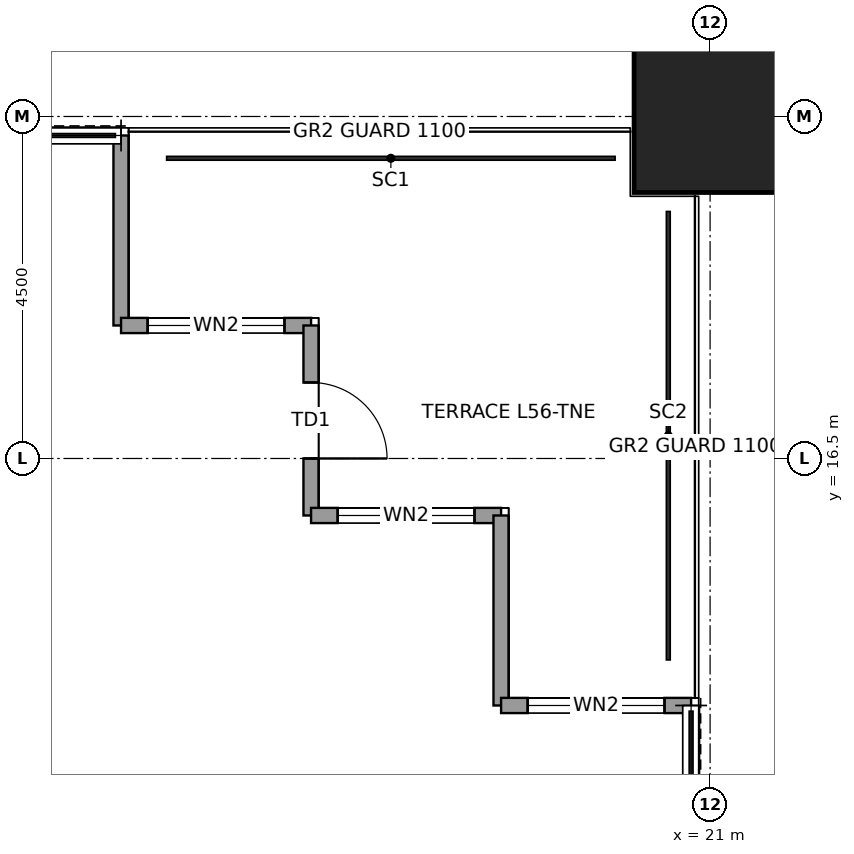
"""IFC4 building model, lengths in metres.
Left out: names, types, materials, properties, quantities, classifications, styles, units other than length and angle.
Written with IfcOpenShell. Run it as: python <this file> out.ifc"""

import sys

from ifc_helpers import new_model, si_unit, direction, frame, frame_2d, origin, origin_2d, place, context, subcontext, project, spatial, rectangle, hollow_rectangle, extrude, element, fill, save


model = new_model("IFC4")
c1 = context("Model", 3, precision=1e-05, world=origin(), true_north=direction((0.0, 1.0)))
c2 = subcontext(c1, "Body", "Model", "MODEL_VIEW")
j1 = project(units=[si_unit("LENGTHUNIT", "METRE"), si_unit("PLANEANGLEUNIT", "RADIAN")], contexts=[c1])
p1 = place(None, origin())
s1 = spatial("IfcSite", under=j1, at=p1, CompositionType="ELEMENT")
p2 = place(p1, origin())
s2 = spatial("IfcBuilding", under=s1, at=p2, CompositionType="ELEMENT")
p3 = place(p2, frame((0.0, 0.0, 259.9)))
s3 = spatial("IfcBuildingStorey", under=s2, at=p3, CompositionType="ELEMENT", Elevation=259.9)
p4 = place(p3, frame((21.0, 21.0, 0.0), z_axis=(0.0, 0.0, 1.0), x_axis=(1.0, 0.0, 0.0)))
e1 = element("IfcColumn", 1, at=p4, inside=s3, PredefinedType="COLUMN", context=c2, shape_type="SweptSolid", body=[
    extrude(hollow_rectangle(XDim=2.0, YDim=2.0, WallThickness=0.095, at=origin_2d()), origin(), (0.0, 0.0, 1.0), 4.0),
])
p5 = place(p3, frame((13.25, 20.75, 0.0), z_axis=(0.0, 0.0, 1.0), x_axis=(0.0, -1.0, 0.0)))
e2 = element("IfcWall", 2, at=p5, inside=s3, PredefinedType="SOLIDWALL", context=c2, shape_type="SweptSolid", body=[
    extrude(rectangle(XDim=2.5, YDim=0.2, at=frame_2d((1.25, 0.0))), origin(), (0.0, 0.0, 1.0), 3.85),
])
p6 = place(p3, frame((13.25, 18.25, 0.0), z_axis=(0.0, 0.0, 1.0), x_axis=(1.0, 0.0, 0.0)))
e3 = element("IfcWall", 3, at=p6, inside=s3, PredefinedType="SOLIDWALL", context=c2, shape_type="SweptSolid", body=[
    extrude(rectangle(XDim=2.5, YDim=0.2, at=frame_2d((1.25, 0.0))), origin(), (0.0, 0.0, 1.0), 3.85),
])
p7 = place(p6, frame((0.35, 0.0, 0.3)))
e4 = element("IfcOpeningElement", 4, at=p7, cuts=e3, PredefinedType="OPENING", context=c2, shape_type="SweptSolid", body=[
    extrude(rectangle(XDim=1.8, YDim=2.4, at=frame_2d((0.9, 1.2))), frame((0.0, 0.11, 0.0), z_axis=(0.0, -1.0, 0.0), x_axis=(1.0, 0.0, 0.0)), (0.0, 0.0, 1.0), 0.22),
])
p8 = place(p3, frame((15.75, 18.25, 0.0), z_axis=(0.0, 0.0, 1.0), x_axis=(0.0, -1.0, 0.0)))
e5 = element("IfcWall", 5, at=p8, inside=s3, PredefinedType="SOLIDWALL", context=c2, shape_type="SweptSolid", body=[
    extrude(rectangle(XDim=2.5, YDim=0.2, at=frame_2d((1.25, 0.0))), origin(), (0.0, 0.0, 1.0), 3.317),
])
p9 = place(p8, frame((0.75, 0.0, 0.0)))
e6 = element("IfcOpeningElement", 6, at=p9, cuts=e5, PredefinedType="OPENING", context=c2, shape_type="SweptSolid", body=[
    extrude(rectangle(XDim=1.0, YDim=2.4, at=frame_2d((0.5, 1.2))), frame((0.0, 0.11, 0.0), z_axis=(0.0, -1.0, 0.0), x_axis=(1.0, 0.0, 0.0)), (0.0, 0.0, 1.0), 0.22),
])
p10 = place(p3, frame((15.75, 15.75, 0.0), z_axis=(0.0, 0.0, 1.0), x_axis=(1.0, 0.0, 0.0)))
e7 = element("IfcWall", 7, at=p10, inside=s3, PredefinedType="SOLIDWALL", context=c2, shape_type="SweptSolid", body=[
    extrude(rectangle(XDim=2.5, YDim=0.2, at=frame_2d((1.25, 0.0))), origin(), (0.0, 0.0, 1.0), 3.85),
])
p11 = place(p10, frame((0.35, 0.0, 0.3)))
e8 = element("IfcOpeningElement", 8, at=p11, cuts=e7, PredefinedType="OPENING", context=c2, shape_type="SweptSolid", body=[
    extrude(rectangle(XDim=1.8, YDim=2.4, at=frame_2d((0.9, 1.2))), frame((0.0, 0.11, 0.0), z_axis=(0.0, -1.0, 0.0), x_axis=(1.0, 0.0, 0.0)), (0.0, 0.0, 1.0), 0.22),
])
p12 = place(p3, frame((18.25, 15.75, 0.0), z_axis=(0.0, 0.0, 1.0), x_axis=(0.0, -1.0, 0.0)))
e9 = element("IfcWall", 9, at=p12, inside=s3, PredefinedType="SOLIDWALL", context=c2, shape_type="SweptSolid", body=[
    extrude(rectangle(XDim=2.5, YDim=0.2, at=frame_2d((1.25, 0.0))), origin(), (0.0, 0.0, 1.0), 3.85),
])
p13 = place(p3, frame((18.25, 13.25, 0.0), z_axis=(0.0, 0.0, 1.0), x_axis=(1.0, 0.0, 0.0)))
e10 = element("IfcWall", 10, at=p13, inside=s3, PredefinedType="SOLIDWALL", context=c2, shape_type="SweptSolid", body=[
    extrude(rectangle(XDim=2.5, YDim=0.2, at=frame_2d((1.25, 0.0))), origin(), (0.0, 0.0, 1.0), 3.85),
])
p14 = place(p13, frame((0.35, 0.0, 0.3)))
e11 = element("IfcOpeningElement", 11, at=p14, cuts=e10, PredefinedType="OPENING", context=c2, shape_type="SweptSolid", body=[
    extrude(rectangle(XDim=1.8, YDim=2.4, at=frame_2d((0.9, 1.2))), frame((0.0, 0.11, 0.0), z_axis=(0.0, -1.0, 0.0), x_axis=(1.0, 0.0, 0.0)), (0.0, 0.0, 1.0), 0.22),
])
p15 = place(p7, origin())
e12 = element("IfcWindow", 12, at=p15, inside=s3, PartitioningType="SINGLE_PANEL", PredefinedType="WINDOW", context=c2, shape_type="SweptSolid", body=[
    extrude(rectangle(XDim=1.8, YDim=2.4, at=frame_2d((0.9, 1.2))), frame((0.0, 0.03, 0.0), z_axis=(0.0, -1.0, 0.0), x_axis=(1.0, 0.0, 0.0)), (0.0, 0.0, 1.0), 0.06),
])
fill(e4, e12)
p16 = place(p9, origin())
e13 = element("IfcDoor", 13, at=p16, inside=s3, OperationType="SINGLE_SWING_RIGHT", PredefinedType="DOOR", context=c2, shape_type="SweptSolid", body=[
    extrude(rectangle(XDim=1.0, YDim=2.4, at=frame_2d((0.5, 1.2))), frame((0.0, 0.025, 0.0), z_axis=(0.0, -1.0, 0.0), x_axis=(1.0, 0.0, 0.0)), (0.0, 0.0, 1.0), 0.05),
])
fill(e6, e13)
p17 = place(p11, origin())
e14 = element("IfcWindow", 14, at=p17, inside=s3, PartitioningType="SINGLE_PANEL", PredefinedType="WINDOW", context=c2, shape_type="SweptSolid", body=[
    extrude(rectangle(XDim=1.8, YDim=2.4, at=frame_2d((0.9, 1.2))), frame((0.0, 0.03, 0.0), z_axis=(0.0, -1.0, 0.0), x_axis=(1.0, 0.0, 0.0)), (0.0, 0.0, 1.0), 0.06),
])
fill(e8, e14)
p18 = place(p14, origin())
e15 = element("IfcWindow", 15, at=p18, inside=s3, PartitioningType="SINGLE_PANEL", PredefinedType="WINDOW", context=c2, shape_type="SweptSolid", body=[
    extrude(rectangle(XDim=1.8, YDim=2.4, at=frame_2d((0.9, 1.2))), frame((0.0, 0.03, 0.0), z_axis=(0.0, -1.0, 0.0), x_axis=(1.0, 0.0, 0.0)), (0.0, 0.0, 1.0), 0.06),
])
fill(e11, e15)
save(model, sys.argv[1])
